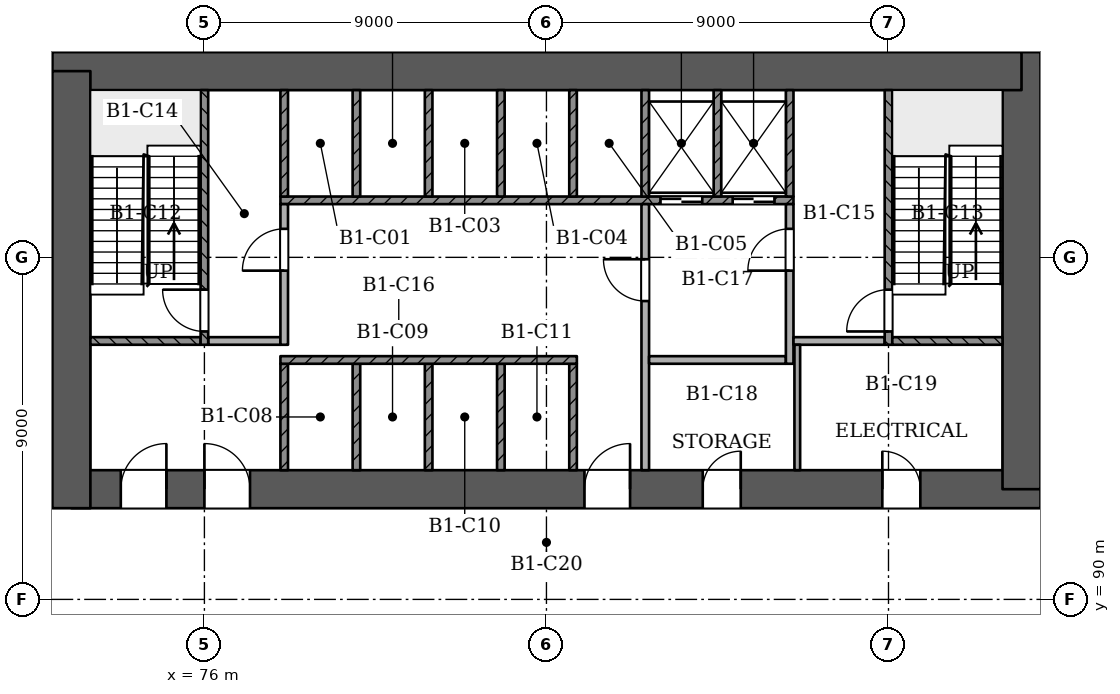
"""IFC4 building model, lengths in metres.
Left out: names, types, materials, properties, quantities, classifications, styles, units other than length and angle.
Written with IfcOpenShell. Run it as: python <this file> out.ifc"""

import sys

from ifc_helpers import new_model, si_unit, direction, frame, frame_2d, origin, place, context, subcontext, project, spatial, rectangle, extrude, element, fill, save


model = new_model("IFC4")
c1 = context("Model", 3, precision=1e-05, world=origin(), true_north=direction((0.0, 1.0)))
c2 = subcontext(c1, "Body", "Model", "MODEL_VIEW")
j1 = project(units=[si_unit("LENGTHUNIT", "METRE"), si_unit("PLANEANGLEUNIT", "RADIAN")], contexts=[c1])
p1 = place(None, origin())
s1 = spatial("IfcSite", under=j1, at=p1, CompositionType="ELEMENT")
p2 = place(p1, origin())
s2 = spatial("IfcBuilding", under=s1, at=p2, CompositionType="ELEMENT")
p3 = place(p2, frame((0.0, 0.0, -4.5)))
s3 = spatial("IfcBuildingStorey", under=s2, at=p3, CompositionType="ELEMENT", Elevation=-4.5)
p4 = place(p3, frame((48.411, 95.474, 0.0), z_axis=(0.0, 0.0, 1.0), x_axis=(0.500000424729, -0.866025158567, 0.0)))
e1 = element("IfcWall", 1, at=p4, inside=s3, PredefinedType="SOLIDWALL", context=c2, shape_type="SweptSolid", body=[
    extrude(rectangle(XDim=62.697, YDim=0.6, at=frame_2d((31.349, 0.0))), origin(), (0.0, 0.0, 1.0), 4.05),
])
p5 = place(p3, frame((90.327, 41.326, 0.0), z_axis=(0.0, 0.0, 1.0), x_axis=(0.499998738597, 0.866026132054, 0.0)))
e2 = element("IfcWall", 2, at=p5, inside=s3, PredefinedType="SOLIDWALL", context=c2, shape_type="SweptSolid", body=[
    extrude(rectangle(XDim=62.698, YDim=0.6, at=frame_2d((31.349, 0.0))), origin(), (0.0, 0.0, 1.0), 4.05),
])
p6 = place(p3, frame((72.5, 92.9, 0.0), z_axis=(0.0, 0.0, 1.0), x_axis=(1.0, 0.0, 0.0)))
e3 = element("IfcWall", 3, at=p6, inside=s3, PredefinedType="SHEAR", context=c2, shape_type="SweptSolid", body=[
    extrude(rectangle(XDim=25.5, YDim=1.0, at=frame_2d((12.75, 0.0))), origin(), (0.0, 0.0, 1.0), 4.5),
])
p7 = place(p6, frame((1.3, 0.0, 0.0)))
e4 = element("IfcOpeningElement", 4, at=p7, cuts=e3, PredefinedType="OPENING", context=c2, shape_type="SweptSolid", body=[
    extrude(rectangle(XDim=1.2, YDim=2.1, at=frame_2d((0.6, 1.05))), frame((0.0, 0.51, 0.0), z_axis=(0.0, -1.0, 0.0), x_axis=(1.0, 0.0, 0.0)), (0.0, 0.0, 1.0), 1.021),
])
p8 = place(p6, frame((3.5, 0.0, 0.0)))
e5 = element("IfcOpeningElement", 5, at=p8, cuts=e3, PredefinedType="OPENING", context=c2, shape_type="SweptSolid", body=[
    extrude(rectangle(XDim=1.2, YDim=2.1, at=frame_2d((0.6, 1.05))), frame((0.0, 0.51, 0.0), z_axis=(0.0, -1.0, 0.0), x_axis=(1.0, 0.0, 0.0)), (0.0, 0.0, 1.0), 1.021),
])
p9 = place(p6, frame((13.5, 0.0, 0.0)))
e6 = element("IfcOpeningElement", 6, at=p9, cuts=e3, PredefinedType="OPENING", context=c2, shape_type="SweptSolid", body=[
    extrude(rectangle(XDim=1.2, YDim=2.1, at=frame_2d((0.6, 1.05))), frame((0.0, 0.51, 0.0), z_axis=(0.0, -1.0, 0.0), x_axis=(1.0, 0.0, 0.0)), (0.0, 0.0, 1.0), 1.021),
])
p10 = place(p6, frame((16.613, 0.0, 0.0)))
e7 = element("IfcOpeningElement", 7, at=p10, cuts=e3, PredefinedType="OPENING", context=c2, shape_type="SweptSolid", body=[
    extrude(rectangle(XDim=1.0, YDim=2.1, at=frame_2d((0.5, 1.05))), frame((0.0, 0.51, 0.0), z_axis=(0.0, -1.0, 0.0), x_axis=(1.0, 0.0, 0.0)), (0.0, 0.0, 1.0), 1.021),
])
p11 = place(p6, frame((21.337, 0.0, 0.0)))
e8 = element("IfcOpeningElement", 8, at=p11, cuts=e3, PredefinedType="OPENING", context=c2, shape_type="SweptSolid", body=[
    extrude(rectangle(XDim=1.0, YDim=2.1, at=frame_2d((0.5, 1.05))), frame((0.0, 0.51, 0.0), z_axis=(0.0, -1.0, 0.0), x_axis=(1.0, 0.0, 0.0)), (0.0, 0.0, 1.0), 1.021),
])
p12 = place(p3, frame((97.5, 92.9, 0.0), z_axis=(0.0, 0.0, 1.0), x_axis=(0.0, 1.0, 0.0)))
e9 = element("IfcWall", 9, at=p12, inside=s3, PredefinedType="SHEAR", context=c2, shape_type="SweptSolid", body=[
    extrude(rectangle(XDim=11.5, YDim=1.0, at=frame_2d((5.75, 0.0))), origin(), (0.0, 0.0, 1.0), 4.5),
])
p13 = place(p3, frame((97.5, 103.9, 0.0), z_axis=(0.0, 0.0, 1.0), x_axis=(-1.0, 0.0, 0.0)))
e10 = element("IfcWall", 10, at=p13, inside=s3, PredefinedType="SHEAR", context=c2, shape_type="SweptSolid", body=[
    extrude(rectangle(XDim=25.5, YDim=1.0, at=frame_2d((12.75, 0.0))), origin(), (0.0, 0.0, 1.0), 4.5),
])
p14 = place(p3, frame((72.5, 103.9, 0.0), z_axis=(0.0, 0.0, 1.0), x_axis=(0.0, -1.0, 0.0)))
e11 = element("IfcWall", 11, at=p14, inside=s3, PredefinedType="SHEAR", context=c2, shape_type="SweptSolid", body=[
    extrude(rectangle(XDim=11.5, YDim=1.0, at=frame_2d((5.75, 0.0))), origin(), (0.0, 0.0, 1.0), 4.5),
])
for number, where, z_axis, x_axis in (
    (12, (78.1, 93.4, 0.0), (0.0, 0.0, 1.0), (0.0, 1.0, 0.0)),
    (13, (80.0, 93.4, 0.0), (0.0, 0.0, 1.0), (0.0, 1.0, 0.0)),
    (14, (81.9, 93.4, 0.0), (0.0, 0.0, 1.0), (0.0, 1.0, 0.0)),
    (15, (83.8, 93.4, 0.0), (0.0, 0.0, 1.0), (0.0, 1.0, 0.0)),
    (16, (85.7, 93.4, 0.0), (0.0, 0.0, 1.0), (0.0, 1.0, 0.0)),
):
    element("IfcWall", number, at=place(p3, frame(where, z_axis=z_axis, x_axis=x_axis)), inside=s3, PredefinedType="SOLIDWALL", context=c2, shape_type="SweptSolid", body=[
        extrude(rectangle(XDim=2.8, YDim=0.2, at=frame_2d((1.4, 0.0))), origin(), (0.0, 0.0, 1.0), 4.05),
    ])
p15 = place(p3, frame((87.6, 93.4, 0.0), z_axis=(0.0, 0.0, 1.0), x_axis=(0.0, 1.0, 0.0)))
e17 = element("IfcWall", 17, at=p15, inside=s3, PredefinedType="PARTITIONING", context=c2, shape_type="SweptSolid", body=[
    extrude(rectangle(XDim=7.0, YDim=0.2, at=frame_2d((3.5, 0.0))), origin(), (0.0, 0.0, 1.0), 4.05),
])
p16 = place(p15, frame((4.45, 0.0, 0.0)))
e18 = element("IfcOpeningElement", 18, at=p16, cuts=e17, PredefinedType="OPENING", context=c2, shape_type="SweptSolid", body=[
    extrude(rectangle(XDim=1.1, YDim=2.1, at=frame_2d((0.55, 1.05))), frame((0.0, 0.11, 0.0), z_axis=(0.0, -1.0, 0.0), x_axis=(1.0, 0.0, 0.0)), (0.0, 0.0, 1.0), 0.221),
])
p17 = place(p3, frame((91.6, 93.4, 0.0), z_axis=(0.0, 0.0, 1.0), x_axis=(0.0, 1.0, 0.0)))
e19 = element("IfcWall", 19, at=p17, inside=s3, PredefinedType="PARTITIONING", context=c2, shape_type="SweptSolid", body=[
    extrude(rectangle(XDim=3.3, YDim=0.15, at=frame_2d((1.65, 0.0))), origin(), (0.0, 0.0, 1.0), 4.05),
])
p18 = place(p3, frame((78.0, 96.3, 0.0), z_axis=(0.0, 0.0, 1.0), x_axis=(1.0, 0.0, 0.0)))
e20 = element("IfcWall", 20, at=p18, inside=s3, PredefinedType="SOLIDWALL", context=c2, shape_type="SweptSolid", body=[
    extrude(rectangle(XDim=7.8, YDim=0.2, at=frame_2d((3.9, 0.0))), origin(), (0.0, 0.0, 1.0), 4.05),
])
p19 = place(p3, frame((87.7, 96.3, 0.0), z_axis=(0.0, 0.0, 1.0), x_axis=(1.0, 0.0, 0.0)))
e21 = element("IfcWall", 21, at=p19, inside=s3, PredefinedType="PARTITIONING", context=c2, shape_type="SweptSolid", body=[
    extrude(rectangle(XDim=3.6, YDim=0.2, at=frame_2d((1.8, 0.0))), origin(), (0.0, 0.0, 1.0), 4.05),
])
p20 = place(p3, frame((91.4, 96.2, 0.0), z_axis=(0.0, 0.0, 1.0), x_axis=(0.0, 1.0, 0.0)))
e22 = element("IfcWall", 22, at=p20, inside=s3, PredefinedType="PARTITIONING", context=c2, shape_type="SweptSolid", body=[
    extrude(rectangle(XDim=4.2, YDim=0.2, at=frame_2d((2.1, 0.0))), origin(), (0.0, 0.0, 1.0), 4.05),
])
p21 = place(p20, frame((2.45, 0.0, 0.0)))
e23 = element("IfcOpeningElement", 23, at=p21, cuts=e22, PredefinedType="OPENING", context=c2, shape_type="SweptSolid", body=[
    extrude(rectangle(XDim=1.1, YDim=2.1, at=frame_2d((0.55, 1.05))), frame((0.0, 0.11, 0.0), z_axis=(0.0, -1.0, 0.0), x_axis=(1.0, 0.0, 0.0)), (0.0, 0.0, 1.0), 0.221),
])
p22 = place(p3, frame((73.0, 96.8, 0.0), z_axis=(0.0, 0.0, 1.0), x_axis=(1.0, 0.0, 0.0)))
e24 = element("IfcWall", 24, at=p22, inside=s3, PredefinedType="SOLIDWALL", context=c2, shape_type="SweptSolid", body=[
    extrude(rectangle(XDim=2.9, YDim=0.2, at=frame_2d((1.45, 0.0))), origin(), (0.0, 0.0, 1.0), 4.05),
])
p23 = place(p3, frame((76.0, 96.7, 0.0), z_axis=(0.0, 0.0, 1.0), x_axis=(0.0, 1.0, 0.0)))
e25 = element("IfcWall", 25, at=p23, inside=s3, PredefinedType="SOLIDWALL", context=c2, shape_type="SweptSolid", body=[
    extrude(rectangle(XDim=6.7, YDim=0.2, at=frame_2d((3.35, 0.0))), origin(), (0.0, 0.0, 1.0), 4.05),
])
p24 = place(p23, frame((0.35, 0.0, 0.0)))
e26 = element("IfcOpeningElement", 26, at=p24, cuts=e25, PredefinedType="OPENING", context=c2, shape_type="SweptSolid", body=[
    extrude(rectangle(XDim=1.1, YDim=2.1, at=frame_2d((0.55, 1.05))), frame((0.0, 0.11, 0.0), z_axis=(0.0, -1.0, 0.0), x_axis=(1.0, 0.0, 0.0)), (0.0, 0.0, 1.0), 0.221),
])
p25 = place(p3, frame((76.1, 96.8, 0.0), z_axis=(0.0, 0.0, 1.0), x_axis=(1.0, 0.0, 0.0)))
e27 = element("IfcWall", 27, at=p25, inside=s3, PredefinedType="PARTITIONING", context=c2, shape_type="SweptSolid", body=[
    extrude(rectangle(XDim=1.9, YDim=0.2, at=frame_2d((0.95, 0.0))), origin(), (0.0, 0.0, 1.0), 4.05),
])
p26 = place(p3, frame((78.1, 96.7, 0.0), z_axis=(0.0, 0.0, 1.0), x_axis=(0.0, 1.0, 0.0)))
e28 = element("IfcWall", 28, at=p26, inside=s3, PredefinedType="PARTITIONING", context=c2, shape_type="SweptSolid", body=[
    extrude(rectangle(XDim=3.7, YDim=0.2, at=frame_2d((1.85, 0.0))), origin(), (0.0, 0.0, 1.0), 4.05),
])
p27 = place(p26, frame((1.95, 0.0, 0.0)))
e29 = element("IfcOpeningElement", 29, at=p27, cuts=e28, PredefinedType="OPENING", context=c2, shape_type="SweptSolid", body=[
    extrude(rectangle(XDim=1.1, YDim=2.1, at=frame_2d((0.55, 1.05))), frame((0.0, 0.11, 0.0), z_axis=(0.0, -1.0, 0.0), x_axis=(1.0, 0.0, 0.0)), (0.0, 0.0, 1.0), 0.221),
])
p28 = place(p3, frame((91.5, 96.8, 0.0), z_axis=(0.0, 0.0, 1.0), x_axis=(1.0, 0.0, 0.0)))
e30 = element("IfcWall", 30, at=p28, inside=s3, PredefinedType="PARTITIONING", context=c2, shape_type="SweptSolid", body=[
    extrude(rectangle(XDim=2.4, YDim=0.2, at=frame_2d((1.2, 0.0))), origin(), (0.0, 0.0, 1.0), 4.05),
])
p29 = place(p3, frame((94.0, 96.7, 0.0), z_axis=(0.0, 0.0, 1.0), x_axis=(0.0, 1.0, 0.0)))
e31 = element("IfcWall", 31, at=p29, inside=s3, PredefinedType="SOLIDWALL", context=c2, shape_type="SweptSolid", body=[
    extrude(rectangle(XDim=6.7, YDim=0.2, at=frame_2d((3.35, 0.0))), origin(), (0.0, 0.0, 1.0), 4.05),
])
p30 = place(p29, frame((0.35, 0.0, 0.0)))
e32 = element("IfcOpeningElement", 32, at=p30, cuts=e31, PredefinedType="OPENING", context=c2, shape_type="SweptSolid", body=[
    extrude(rectangle(XDim=1.1, YDim=2.1, at=frame_2d((0.55, 1.05))), frame((0.0, 0.11, 0.0), z_axis=(0.0, -1.0, 0.0), x_axis=(1.0, 0.0, 0.0)), (0.0, 0.0, 1.0), 0.221),
])
p31 = place(p3, frame((94.1, 96.8, 0.0), z_axis=(0.0, 0.0, 1.0), x_axis=(1.0, 0.0, 0.0)))
e33 = element("IfcWall", 33, at=p31, inside=s3, PredefinedType="SOLIDWALL", context=c2, shape_type="SweptSolid", body=[
    extrude(rectangle(XDim=2.9, YDim=0.2, at=frame_2d((1.45, 0.0))), origin(), (0.0, 0.0, 1.0), 4.05),
])
p32 = place(p3, frame((78.0, 100.5, 0.0), z_axis=(0.0, 0.0, 1.0), x_axis=(1.0, 0.0, 0.0)))
e34 = element("IfcWall", 34, at=p32, inside=s3, PredefinedType="SOLIDWALL", context=c2, shape_type="SweptSolid", body=[
    extrude(rectangle(XDim=13.5, YDim=0.2, at=frame_2d((6.75, 0.0))), origin(), (0.0, 0.0, 1.0), 4.05),
])
p33 = place(p32, frame((10.0, 0.0, 0.0)))
e35 = element("IfcOpeningElement", 35, at=p33, cuts=e34, PredefinedType="OPENING", context=c2, shape_type="SweptSolid", body=[
    extrude(rectangle(XDim=1.1, YDim=2.1, at=frame_2d((0.55, 1.05))), frame((0.0, 0.11, 0.0), z_axis=(0.0, -1.0, 0.0), x_axis=(1.0, 0.0, 0.0)), (0.0, 0.0, 1.0), 0.221),
])
p34 = place(p32, frame((11.9, 0.0, 0.0)))
e36 = element("IfcOpeningElement", 36, at=p34, cuts=e34, PredefinedType="OPENING", context=c2, shape_type="SweptSolid", body=[
    extrude(rectangle(XDim=1.1, YDim=2.1, at=frame_2d((0.55, 1.05))), frame((0.0, 0.11, 0.0), z_axis=(0.0, -1.0, 0.0), x_axis=(1.0, 0.0, 0.0)), (0.0, 0.0, 1.0), 0.221),
])
for number, where, z_axis, x_axis in (
    (37, (78.1, 100.6, 0.0), (0.0, 0.0, 1.0), (0.0, 1.0, 0.0)),
    (38, (80.0, 100.6, 0.0), (0.0, 0.0, 1.0), (0.0, 1.0, 0.0)),
    (39, (81.9, 100.6, 0.0), (0.0, 0.0, 1.0), (0.0, 1.0, 0.0)),
    (40, (83.8, 100.6, 0.0), (0.0, 0.0, 1.0), (0.0, 1.0, 0.0)),
    (41, (85.7, 100.6, 0.0), (0.0, 0.0, 1.0), (0.0, 1.0, 0.0)),
    (42, (87.6, 100.6, 0.0), (0.0, 0.0, 1.0), (0.0, 1.0, 0.0)),
    (43, (89.5, 100.6, 0.0), (0.0, 0.0, 1.0), (0.0, 1.0, 0.0)),
    (44, (91.4, 100.6, 0.0), (0.0, 0.0, 1.0), (0.0, 1.0, 0.0)),
):
    element("IfcWall", number, at=place(p3, frame(where, z_axis=z_axis, x_axis=x_axis)), inside=s3, PredefinedType="SOLIDWALL", context=c2, shape_type="SweptSolid", body=[
        extrude(rectangle(XDim=2.8, YDim=0.2, at=frame_2d((1.4, 0.0))), origin(), (0.0, 0.0, 1.0), 4.05),
    ])
p35 = place(p33, origin())
e45 = element("IfcDoor", 45, at=p35, inside=s3, OperationType="SLIDING_TO_RIGHT", PredefinedType="NOTDEFINED", context=c2, shape_type="SweptSolid", body=[
    extrude(rectangle(XDim=1.1, YDim=2.1, at=frame_2d((0.55, 1.05))), frame((0.0, 0.025, 0.0), z_axis=(0.0, -1.0, 0.0), x_axis=(1.0, 0.0, 0.0)), (0.0, 0.0, 1.0), 0.05),
])
fill(e35, e45)
p36 = place(p34, origin())
e46 = element("IfcDoor", 46, at=p36, inside=s3, OperationType="SLIDING_TO_LEFT", PredefinedType="NOTDEFINED", context=c2, shape_type="SweptSolid", body=[
    extrude(rectangle(XDim=1.1, YDim=2.1, at=frame_2d((0.55, 1.05))), frame((0.0, 0.025, 0.0), z_axis=(0.0, -1.0, 0.0), x_axis=(1.0, 0.0, 0.0)), (0.0, 0.0, 1.0), 0.05),
])
fill(e36, e46)
p37 = place(p24, origin())
e47 = element("IfcDoor", 47, at=p37, inside=s3, OperationType="SINGLE_SWING_RIGHT", PredefinedType="NOTDEFINED", context=c2, shape_type="SweptSolid", body=[
    extrude(rectangle(XDim=1.1, YDim=2.1, at=frame_2d((0.55, 1.05))), frame((0.0, 0.025, 0.0), z_axis=(0.0, -1.0, 0.0), x_axis=(1.0, 0.0, 0.0)), (0.0, 0.0, 1.0), 0.05),
])
fill(e26, e47)
p38 = place(p30, origin())
e48 = element("IfcDoor", 48, at=p38, inside=s3, OperationType="SINGLE_SWING_LEFT", PredefinedType="NOTDEFINED", context=c2, shape_type="SweptSolid", body=[
    extrude(rectangle(XDim=1.1, YDim=2.1, at=frame_2d((0.55, 1.05))), frame((0.0, 0.025, 0.0), z_axis=(0.0, -1.0, 0.0), x_axis=(1.0, 0.0, 0.0)), (0.0, 0.0, 1.0), 0.05),
])
fill(e32, e48)
p39 = place(p27, origin())
e49 = element("IfcDoor", 49, at=p39, inside=s3, OperationType="SINGLE_SWING_LEFT", PredefinedType="NOTDEFINED", context=c2, shape_type="SweptSolid", body=[
    extrude(rectangle(XDim=1.1, YDim=2.1, at=frame_2d((0.55, 1.05))), frame((0.0, 0.025, 0.0), z_axis=(0.0, -1.0, 0.0), x_axis=(1.0, 0.0, 0.0)), (0.0, 0.0, 1.0), 0.05),
])
fill(e29, e49)
p40 = place(p16, origin())
e50 = element("IfcDoor", 50, at=p40, inside=s3, OperationType="SINGLE_SWING_RIGHT", PredefinedType="NOTDEFINED", context=c2, shape_type="SweptSolid", body=[
    extrude(rectangle(XDim=1.1, YDim=2.1, at=frame_2d((0.55, 1.05))), frame((0.0, 0.025, 0.0), z_axis=(0.0, -1.0, 0.0), x_axis=(1.0, 0.0, 0.0)), (0.0, 0.0, 1.0), 0.05),
])
fill(e18, e50)
p41 = place(p21, origin())
e51 = element("IfcDoor", 51, at=p41, inside=s3, OperationType="SINGLE_SWING_LEFT", PredefinedType="NOTDEFINED", context=c2, shape_type="SweptSolid", body=[
    extrude(rectangle(XDim=1.1, YDim=2.1, at=frame_2d((0.55, 1.05))), frame((0.0, 0.025, 0.0), z_axis=(0.0, -1.0, 0.0), x_axis=(1.0, 0.0, 0.0)), (0.0, 0.0, 1.0), 0.05),
])
fill(e23, e51)
p42 = place(p7, origin())
e52 = element("IfcDoor", 52, at=p42, inside=s3, OperationType="SINGLE_SWING_RIGHT", PredefinedType="NOTDEFINED", context=c2, shape_type="SweptSolid", body=[
    extrude(rectangle(XDim=1.2, YDim=2.1, at=frame_2d((0.6, 1.05))), frame((0.0, 0.025, 0.0), z_axis=(0.0, -1.0, 0.0), x_axis=(1.0, 0.0, 0.0)), (0.0, 0.0, 1.0), 0.05),
])
fill(e4, e52)
p43 = place(p8, origin())
e53 = element("IfcDoor", 53, at=p43, inside=s3, OperationType="SINGLE_SWING_LEFT", PredefinedType="NOTDEFINED", context=c2, shape_type="SweptSolid", body=[
    extrude(rectangle(XDim=1.2, YDim=2.1, at=frame_2d((0.6, 1.05))), frame((0.0, 0.025, 0.0), z_axis=(0.0, -1.0, 0.0), x_axis=(1.0, 0.0, 0.0)), (0.0, 0.0, 1.0), 0.05),
])
fill(e5, e53)
p44 = place(p9, origin())
e54 = element("IfcDoor", 54, at=p44, inside=s3, OperationType="SINGLE_SWING_RIGHT", PredefinedType="NOTDEFINED", context=c2, shape_type="SweptSolid", body=[
    extrude(rectangle(XDim=1.2, YDim=2.1, at=frame_2d((0.6, 1.05))), frame((0.0, 0.025, 0.0), z_axis=(0.0, -1.0, 0.0), x_axis=(1.0, 0.0, 0.0)), (0.0, 0.0, 1.0), 0.05),
])
fill(e6, e54)
p45 = place(p10, origin())
e55 = element("IfcDoor", 55, at=p45, inside=s3, OperationType="SINGLE_SWING_RIGHT", PredefinedType="NOTDEFINED", context=c2, shape_type="SweptSolid", body=[
    extrude(rectangle(XDim=1.0, YDim=2.1, at=frame_2d((0.5, 1.05))), frame((0.0, 0.025, 0.0), z_axis=(0.0, -1.0, 0.0), x_axis=(1.0, 0.0, 0.0)), (0.0, 0.0, 1.0), 0.05),
])
fill(e7, e55)
p46 = place(p11, origin())
e56 = element("IfcDoor", 56, at=p46, inside=s3, OperationType="SINGLE_SWING_LEFT", PredefinedType="NOTDEFINED", context=c2, shape_type="SweptSolid", body=[
    extrude(rectangle(XDim=1.0, YDim=2.1, at=frame_2d((0.5, 1.05))), frame((0.0, 0.025, 0.0), z_axis=(0.0, -1.0, 0.0), x_axis=(1.0, 0.0, 0.0)), (0.0, 0.0, 1.0), 0.05),
])
fill(e8, e56)
save(model, sys.argv[1])
